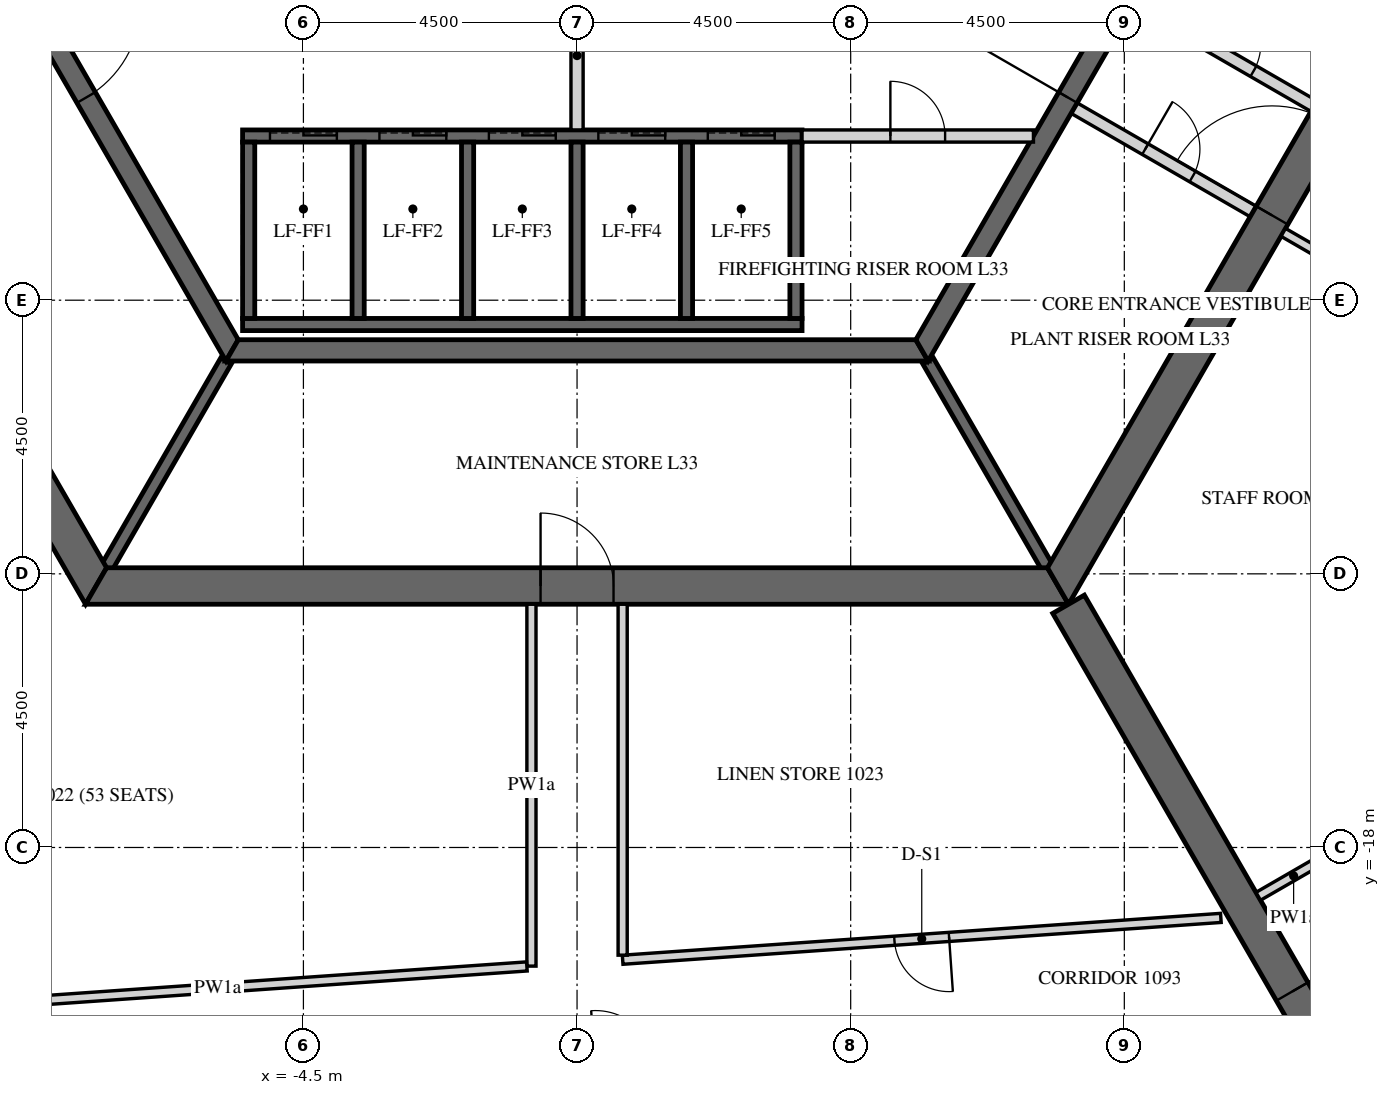
"""IFC4 building model, lengths in metres.
Left out: names, types, materials, properties, quantities, classifications, styles, units other than length and angle.
Written with IfcOpenShell. Run it as: python <this file> out.ifc"""

import sys

from ifc_helpers import new_model, si_unit, direction, frame, frame_2d, origin, place, context, subcontext, project, spatial, polyline, rectangle, outline, extrude, element, fill, save


model = new_model("IFC4")
c1 = context("Model", 3, precision=1e-05, world=origin(), true_north=direction((0.0, 1.0)))
c2 = subcontext(c1, "Body", "Model", "MODEL_VIEW")
j1 = project(units=[si_unit("LENGTHUNIT", "METRE"), si_unit("PLANEANGLEUNIT", "RADIAN")], contexts=[c1])
p1 = place(None, origin())
s1 = spatial("IfcSite", under=j1, at=p1, CompositionType="ELEMENT")
p2 = place(p1, origin())
s2 = spatial("IfcBuilding", under=s1, at=p2, CompositionType="ELEMENT")
p3 = place(p2, frame((0.0, 0.0, 142.8)))
s3 = spatial("IfcBuildingStorey", under=s2, at=p3, CompositionType="ELEMENT", Elevation=142.8)
p4 = place(p3, frame((-15.819, 0.0, -0.15), z_axis=(0.0, 0.0, 1.0), x_axis=(0.499999880136, -0.866025472988, 0.0)))
e1 = element("IfcWall", 1, at=p4, inside=s3, PredefinedType="SHEAR", context=c2, shape_type="SweptSolid", body=[
    extrude(outline(polyline([(-0.173, -0.3), (15.993, -0.3), (15.646, 0.3), (0.173, 0.3), (-0.173, -0.3)])), origin(), (0.0, 0.0, 1.0), 3.75),
])
p5 = place(p4, frame((6.981, 0.0, 0.15)))
e2 = element("IfcOpeningElement", 2, at=p5, cuts=e1, PredefinedType="OPENING", context=c2, shape_type="SweptSolid", body=[
    extrude(rectangle(XDim=1.8, YDim=2.4, at=frame_2d((0.9, 1.2))), frame((0.0, 0.31, 0.0), z_axis=(0.0, -1.0, 0.0), x_axis=(1.0, 0.0, 0.0)), (0.0, 0.0, 1.0), 0.62),
])
p6 = place(p3, frame((-7.91, -13.7, -0.15), z_axis=(0.0, 0.0, 1.0), x_axis=(1.0, 0.0, 0.0)))
e3 = element("IfcWall", 3, at=p6, inside=s3, PredefinedType="SHEAR", context=c2, shape_type="SweptSolid", body=[
    extrude(outline(polyline([(-0.173, -0.3), (15.993, -0.3), (15.646, 0.3), (0.173, 0.3), (-0.173, -0.3)])), origin(), (0.0, 0.0, 1.0), 3.75),
])
p7 = place(p6, frame((7.31, 0.0, 0.15)))
e4 = element("IfcOpeningElement", 4, at=p7, cuts=e3, PredefinedType="OPENING", context=c2, shape_type="SweptSolid", body=[
    extrude(rectangle(XDim=1.2, YDim=2.4, at=frame_2d((0.6, 1.2))), frame((0.0, 0.31, 0.0), z_axis=(0.0, -1.0, 0.0), x_axis=(1.0, 0.0, 0.0)), (0.0, 0.0, 1.0), 0.62),
])
p8 = place(p3, frame((7.91, -13.7, -0.15), z_axis=(0.0, 0.0, 1.0), x_axis=(0.499999880136, 0.866025472988, 0.0)))
e5 = element("IfcWall", 5, at=p8, inside=s3, PredefinedType="SHEAR", context=c2, shape_type="SweptSolid", body=[
    extrude(outline(polyline([(-0.173, -0.3), (15.993, -0.3), (15.646, 0.3), (0.173, 0.3), (-0.173, -0.3)])), origin(), (0.0, 0.0, 1.0), 3.75),
])
p9 = place(p8, frame((7.039, 0.0, 0.15)))
e6 = element("IfcOpeningElement", 6, at=p9, cuts=e5, PredefinedType="OPENING", context=c2, shape_type="SweptSolid", body=[
    extrude(rectangle(XDim=1.8, YDim=2.4, at=frame_2d((0.9, 1.2))), frame((0.0, 0.31, 0.0), z_axis=(0.0, -1.0, 0.0), x_axis=(1.0, 0.0, 0.0)), (0.0, 0.0, 1.0), 0.62),
])
p10 = place(p3, frame((8.083, -14.0, -0.15), z_axis=(0.0, 0.0, 1.0), x_axis=(0.499997680643, -0.866026742862, 0.0)))
e7 = element("IfcWall", 7, at=p10, inside=s3, PredefinedType="SHEAR", context=c2, shape_type="SweptSolid", body=[
    extrude(rectangle(XDim=16.509, YDim=0.6, at=frame_2d((8.254, 0.0))), origin(), (0.0, 0.0, 1.0), 3.75),
])
p11 = place(p10, frame((7.354, 0.0, 0.15)))
e8 = element("IfcOpeningElement", 8, at=p11, cuts=e7, PredefinedType="OPENING", context=c2, shape_type="SweptSolid", body=[
    extrude(rectangle(XDim=1.8, YDim=2.4, at=frame_2d((0.9, 1.2))), frame((0.0, 0.31, 0.0), z_axis=(0.0, -1.0, 0.0), x_axis=(1.0, 0.0, 0.0)), (0.0, 0.0, 1.0), 0.62),
])
p12 = place(p3, frame((-11.345, 0.0, -0.15), z_axis=(0.0, 0.0, 1.0), x_axis=(0.499995046907, -0.866028263435, 0.0)))
e9 = element("IfcWall", 9, at=p12, inside=s3, PredefinedType="SHEAR", context=c2, shape_type="SweptSolid", body=[
    extrude(outline(polyline([(-0.101, -0.175), (11.446, -0.175), (11.244, 0.175), (0.101, 0.175), (-0.101, -0.175)])), origin(), (0.0, 0.0, 1.0), 3.75),
])
p13 = place(p12, frame((4.744, 0.0, 0.15)))
e10 = element("IfcOpeningElement", 10, at=p13, cuts=e9, PredefinedType="OPENING", context=c2, shape_type="SweptSolid", body=[
    extrude(rectangle(XDim=1.8, YDim=2.4, at=frame_2d((0.9, 1.2))), frame((0.0, 0.185, 0.0), z_axis=(0.0, -1.0, 0.0), x_axis=(1.0, 0.0, 0.0)), (0.0, 0.0, 1.0), 0.37),
])
p14 = place(p3, frame((-5.673, -9.825, -0.15), z_axis=(0.0, 0.0, 1.0), x_axis=(1.0, 0.0, 0.0)))
e11 = element("IfcWall", 11, at=p14, inside=s3, PredefinedType="SHEAR", context=c2, shape_type="SweptSolid", body=[
    extrude(outline(polyline([(-0.101, -0.175), (11.446, -0.175), (11.244, 0.175), (0.101, 0.175), (-0.101, -0.175)])), origin(), (0.0, 0.0, 1.0), 3.75),
])
p15 = place(p3, frame((5.673, -9.825, -0.15), z_axis=(0.0, 0.0, 1.0), x_axis=(0.499995046907, 0.866028263435, 0.0)))
e12 = element("IfcWall", 12, at=p15, inside=s3, PredefinedType="SHEAR", context=c2, shape_type="SweptSolid", body=[
    extrude(outline(polyline([(-0.101, -0.175), (11.446, -0.175), (11.244, 0.175), (0.101, 0.175), (-0.101, -0.175)])), origin(), (0.0, 0.0, 1.0), 3.75),
])
p16 = place(p15, frame((4.801, 0.0, 0.15)))
e13 = element("IfcOpeningElement", 13, at=p16, cuts=e12, PredefinedType="OPENING", context=c2, shape_type="SweptSolid", body=[
    extrude(rectangle(XDim=1.8, YDim=2.4, at=frame_2d((0.9, 1.2))), frame((0.0, 0.185, 0.0), z_axis=(0.0, -1.0, 0.0), x_axis=(1.0, 0.0, 0.0)), (0.0, 0.0, 1.0), 0.37),
])
p17 = place(p3, frame((-5.5, -6.3, -0.25), z_axis=(0.0, 0.0, 1.0), x_axis=(1.0, 0.0, 0.0)))
e14 = element("IfcWall", 14, at=p17, inside=s3, PredefinedType="SHEAR", context=c2, shape_type="SweptSolid", body=[
    extrude(rectangle(XDim=9.2, YDim=0.2, at=frame_2d((4.6, 0.0))), origin(), (0.0, 0.0, 1.0), 3.9),
])
p18 = place(p17, frame((0.45, 0.0, 0.25)))
e15 = element("IfcOpeningElement", 15, at=p18, cuts=e14, PredefinedType="OPENING", context=c2, shape_type="SweptSolid", body=[
    extrude(rectangle(XDim=1.1, YDim=2.1, at=frame_2d((0.55, 1.05))), frame((0.0, 0.11, 0.0), z_axis=(0.0, -1.0, 0.0), x_axis=(1.0, 0.0, 0.0)), (0.0, 0.0, 1.0), 0.22),
])
p19 = place(p17, frame((2.25, 0.0, 0.25)))
e16 = element("IfcOpeningElement", 16, at=p19, cuts=e14, PredefinedType="OPENING", context=c2, shape_type="SweptSolid", body=[
    extrude(rectangle(XDim=1.1, YDim=2.1, at=frame_2d((0.55, 1.05))), frame((0.0, 0.11, 0.0), z_axis=(0.0, -1.0, 0.0), x_axis=(1.0, 0.0, 0.0)), (0.0, 0.0, 1.0), 0.22),
])
p20 = place(p17, frame((4.05, 0.0, 0.25)))
e17 = element("IfcOpeningElement", 17, at=p20, cuts=e14, PredefinedType="OPENING", context=c2, shape_type="SweptSolid", body=[
    extrude(rectangle(XDim=1.1, YDim=2.1, at=frame_2d((0.55, 1.05))), frame((0.0, 0.11, 0.0), z_axis=(0.0, -1.0, 0.0), x_axis=(1.0, 0.0, 0.0)), (0.0, 0.0, 1.0), 0.22),
])
p21 = place(p17, frame((5.85, 0.0, 0.25)))
e18 = element("IfcOpeningElement", 18, at=p21, cuts=e14, PredefinedType="OPENING", context=c2, shape_type="SweptSolid", body=[
    extrude(rectangle(XDim=1.1, YDim=2.1, at=frame_2d((0.55, 1.05))), frame((0.0, 0.11, 0.0), z_axis=(0.0, -1.0, 0.0), x_axis=(1.0, 0.0, 0.0)), (0.0, 0.0, 1.0), 0.22),
])
p22 = place(p17, frame((7.65, 0.0, 0.25)))
e19 = element("IfcOpeningElement", 19, at=p22, cuts=e14, PredefinedType="OPENING", context=c2, shape_type="SweptSolid", body=[
    extrude(rectangle(XDim=1.1, YDim=2.1, at=frame_2d((0.55, 1.05))), frame((0.0, 0.11, 0.0), z_axis=(0.0, -1.0, 0.0), x_axis=(1.0, 0.0, 0.0)), (0.0, 0.0, 1.0), 0.22),
])
p23 = place(p3, frame((-5.5, -9.4, -0.25), z_axis=(0.0, 0.0, 1.0), x_axis=(1.0, 0.0, 0.0)))
e20 = element("IfcWall", 20, at=p23, inside=s3, PredefinedType="SHEAR", context=c2, shape_type="SweptSolid", body=[
    extrude(rectangle(XDim=9.2, YDim=0.2, at=frame_2d((4.6, 0.0))), origin(), (0.0, 0.0, 1.0), 3.9),
])
for number, where, z_axis, x_axis in (
    (21, (-5.4, -9.3, -0.25), (0.0, 0.0, 1.0), (0.0, 1.0, 0.0)),
    (22, (-3.6, -9.3, -0.25), (0.0, 0.0, 1.0), (0.0, 1.0, 0.0)),
    (23, (-1.8, -9.3, -0.25), (0.0, 0.0, 1.0), (0.0, 1.0, 0.0)),
    (24, (0.0, -9.3, -0.25), (0.0, 0.0, 1.0), (0.0, 1.0, 0.0)),
    (25, (1.8, -9.3, -0.25), (0.0, 0.0, 1.0), (0.0, 1.0, 0.0)),
    (26, (3.6, -9.3, -0.25), (0.0, 0.0, 1.0), (0.0, 1.0, 0.0)),
):
    element("IfcWall", number, at=place(p3, frame(where, z_axis=z_axis, x_axis=x_axis)), inside=s3, PredefinedType="SHEAR", context=c2, shape_type="SweptSolid", body=[
        extrude(rectangle(XDim=2.9, YDim=0.2, at=frame_2d((1.45, 0.0))), origin(), (0.0, 0.0, 1.0), 3.9),
    ])
p24 = place(p3, frame((0.0, -6.2, 0.0), z_axis=(0.0, 0.0, 1.0), x_axis=(0.0, 1.0, 0.0)))
e27 = element("IfcWall", 27, at=p24, inside=s3, PredefinedType="PARTITIONING", context=c2, shape_type="SweptSolid", body=[
    extrude(rectangle(XDim=6.1, YDim=0.2, at=frame_2d((3.05, 0.0))), origin(), (0.0, 0.0, 1.0), 3.65),
])
p25 = place(p3, frame((3.7, -6.3, 0.0), z_axis=(0.0, 0.0, 1.0), x_axis=(1.0, 0.0, 0.0)))
e28 = element("IfcWall", 28, at=p25, inside=s3, PredefinedType="PARTITIONING", context=c2, shape_type="SweptSolid", body=[
    extrude(rectangle(XDim=3.806, YDim=0.2, at=frame_2d((1.903, 0.0))), origin(), (0.0, 0.0, 1.0), 3.65),
])
p26 = place(p25, frame((1.453, 0.0, 0.0)))
e29 = element("IfcOpeningElement", 29, at=p26, cuts=e28, PredefinedType="OPENING", context=c2, shape_type="SweptSolid", body=[
    extrude(rectangle(XDim=0.9, YDim=2.1, at=frame_2d((0.45, 1.05))), frame((0.0, 0.11, 0.0), z_axis=(0.0, -1.0, 0.0), x_axis=(1.0, 0.0, 0.0)), (0.0, 0.0, 1.0), 0.22),
])
for number, where, z_axis, x_axis in (
    (30, (-5.773, -10.0, -0.15), (0.0, 0.0, 1.0), (-0.5, -0.866, 0.0)),
    (31, (5.773, -10.0, -0.15), (0.0, 0.0, 1.0), (0.5, -0.866, 0.0)),
):
    element("IfcWall", number, at=place(p3, frame(where, z_axis=z_axis, x_axis=x_axis)), inside=s3, PredefinedType="SHEAR", context=c2, shape_type="SweptSolid", body=[
        extrude(rectangle(XDim=3.926, YDim=0.2, at=frame_2d((1.963, 0.0))), origin(), (0.0, 0.0, 1.0), 3.75),
    ])
p27 = place(p3, frame((9.175, -4.109, 0.0), z_axis=(0.0, 0.0, 1.0), x_axis=(0.865989465428, -0.500062241894, 0.0)))
e32 = element("IfcWall", 32, at=p27, inside=s3, PredefinedType="PARTITIONING", context=c2, shape_type="SweptSolid", body=[
    extrude(rectangle(XDim=3.4, YDim=0.2, at=frame_2d((1.7, 0.0))), origin(), (0.0, 0.0, 1.0), 3.65),
])
p28 = place(p27, frame((1.351, 0.0, 0.0)))
e33 = element("IfcOpeningElement", 33, at=p28, cuts=e32, PredefinedType="OPENING", context=c2, shape_type="SweptSolid", body=[
    extrude(rectangle(XDim=0.9, YDim=2.1, at=frame_2d((0.45, 1.05))), frame((0.0, 0.11, 0.0), z_axis=(0.0, -1.0, 0.0), x_axis=(1.0, 0.0, 0.0)), (0.0, 0.0, 1.0), 0.22),
])
p29 = place(p3, frame((8.175, -5.841, 0.0), z_axis=(0.0, 0.0, 1.0), x_axis=(0.866020560687, -0.500008388397, 0.0)))
e34 = element("IfcWall", 34, at=p29, inside=s3, PredefinedType="PARTITIONING", context=c2, shape_type="SweptSolid", body=[
    extrude(rectangle(XDim=3.4, YDim=0.2, at=frame_2d((1.7, 0.0))), origin(), (0.0, 0.0, 1.0), 3.65),
])
p30 = place(p29, frame((1.35, 0.0, 0.0)))
e35 = element("IfcOpeningElement", 35, at=p30, cuts=e34, PredefinedType="OPENING", context=c2, shape_type="SweptSolid", body=[
    extrude(rectangle(XDim=0.9, YDim=2.1, at=frame_2d((0.45, 1.05))), frame((0.0, 0.11, 0.0), z_axis=(0.0, -1.0, 0.0), x_axis=(1.0, 0.0, 0.0)), (0.0, 0.0, 1.0), 0.22),
])
p31 = place(p3, frame((-0.75, -14.0, 0.0), z_axis=(0.0, 0.0, 1.0), x_axis=(0.0, -1.0, 0.0)))
e36 = element("IfcWall", 36, at=p31, inside=s3, PredefinedType="PARTITIONING", context=c2, shape_type="SweptSolid", body=[
    extrude(rectangle(XDim=5.951, YDim=0.15, at=frame_2d((2.976, 0.0))), origin(), (0.0, 0.0, 1.0), 2.838),
])
p32 = place(p3, frame((-0.825, -19.956, 0.0), z_axis=(0.0, 0.0, 1.0), x_axis=(-0.997562587881, -0.069777383582, 0.0)))
e37 = element("IfcWall", 37, at=p32, inside=s3, PredefinedType="PARTITIONING", context=c2, shape_type="SweptSolid", body=[
    extrude(rectangle(XDim=10.189, YDim=0.15, at=frame_2d((5.094, 0.0))), origin(), (0.0, 0.0, 1.0), 2.838),
])
p33 = place(p3, frame((10.587, -19.158, 0.0), z_axis=(0.0, 0.0, 1.0), x_axis=(-0.997565137136, -0.069740928955, 0.0)))
e38 = element("IfcWall", 38, at=p33, inside=s3, PredefinedType="PARTITIONING", context=c2, shape_type="SweptSolid", body=[
    extrude(rectangle(XDim=9.861, YDim=0.15, at=frame_2d((4.931, 0.0))), origin(), (0.0, 0.0, 1.0), 2.838),
])
p34 = place(p33, frame((4.481, 0.0, 0.0)))
e39 = element("IfcOpeningElement", 39, at=p34, cuts=e38, PredefinedType="OPENING", context=c2, shape_type="SweptSolid", body=[
    extrude(rectangle(XDim=0.9, YDim=2.1, at=frame_2d((0.45, 1.05))), frame((0.0, 0.085, 0.0), z_axis=(0.0, -1.0, 0.0), x_axis=(1.0, 0.0, 0.0)), (0.0, 0.0, 1.0), 0.17),
])
p35 = place(p3, frame((0.75, -19.771, 0.0), z_axis=(0.0, 0.0, 1.0), x_axis=(0.0, 1.0, 0.0)))
e40 = element("IfcWall", 40, at=p35, inside=s3, PredefinedType="PARTITIONING", context=c2, shape_type="SweptSolid", body=[
    extrude(rectangle(XDim=5.771, YDim=0.15, at=frame_2d((2.885, 0.0))), origin(), (0.0, 0.0, 1.0), 2.838),
])
p36 = place(p3, frame((11.614, -7.884, 0.0), z_axis=(0.0, 0.0, 1.0), x_axis=(0.866018092707, -0.500012662943, 0.0)))
e41 = element("IfcWall", 41, at=p36, inside=s3, PredefinedType="PARTITIONING", context=c2, shape_type="SweptSolid", body=[
    extrude(rectangle(XDim=5.85, YDim=0.15, at=frame_2d((2.925, 0.0))), origin(), (0.0, 0.0, 1.0), 2.838),
])
p37 = place(p3, frame((12.366, -18.131, 0.0), z_axis=(0.0, 0.0, 1.0), x_axis=(-0.866043397086, -0.499968833392, 0.0)))
e42 = element("IfcWall", 42, at=p37, inside=s3, PredefinedType="PARTITIONING", context=c2, shape_type="SweptSolid", body=[
    extrude(rectangle(XDim=1.344, YDim=0.15, at=frame_2d((0.672, 0.0))), origin(), (0.0, 0.0, 1.0), 2.838),
])
p38 = place(p9, origin())
e43 = element("IfcDoor", 43, at=p38, inside=s3, OperationType="DOUBLE_DOOR_SINGLE_SWING", PredefinedType="DOOR", context=c2, shape_type="SweptSolid", body=[
    extrude(rectangle(XDim=1.8, YDim=2.4, at=frame_2d((0.9, 1.2))), frame((0.0, 0.025, 0.0), z_axis=(0.0, -1.0, 0.0), x_axis=(1.0, 0.0, 0.0)), (0.0, 0.0, 1.0), 0.05),
])
fill(e6, e43)
p39 = place(p7, origin())
e44 = element("IfcDoor", 44, at=p39, inside=s3, OperationType="SINGLE_SWING_LEFT", PredefinedType="DOOR", context=c2, shape_type="SweptSolid", body=[
    extrude(rectangle(XDim=1.2, YDim=2.4, at=frame_2d((0.6, 1.2))), frame((0.0, 0.025, 0.0), z_axis=(0.0, -1.0, 0.0), x_axis=(1.0, 0.0, 0.0)), (0.0, 0.0, 1.0), 0.05),
])
fill(e4, e44)
p40 = place(p11, origin())
e45 = element("IfcDoor", 45, at=p40, inside=s3, OperationType="DOUBLE_DOOR_SINGLE_SWING", PredefinedType="DOOR", context=c2, shape_type="SweptSolid", body=[
    extrude(rectangle(XDim=1.8, YDim=2.4, at=frame_2d((0.9, 1.2))), frame((0.0, 0.025, 0.0), z_axis=(0.0, -1.0, 0.0), x_axis=(1.0, 0.0, 0.0)), (0.0, 0.0, 1.0), 0.05),
])
fill(e8, e45)
p41 = place(p13, origin())
e46 = element("IfcDoor", 46, at=p41, inside=s3, OperationType="DOUBLE_DOOR_SINGLE_SWING", PredefinedType="DOOR", context=c2, shape_type="SweptSolid", body=[
    extrude(rectangle(XDim=1.8, YDim=2.4, at=frame_2d((0.9, 1.2))), frame((0.0, 0.025, 0.0), z_axis=(0.0, -1.0, 0.0), x_axis=(1.0, 0.0, 0.0)), (0.0, 0.0, 1.0), 0.05),
])
fill(e10, e46)
p42 = place(p16, origin())
e47 = element("IfcDoor", 47, at=p42, inside=s3, OperationType="DOUBLE_DOOR_SINGLE_SWING", PredefinedType="DOOR", context=c2, shape_type="SweptSolid", body=[
    extrude(rectangle(XDim=1.8, YDim=2.4, at=frame_2d((0.9, 1.2))), frame((0.0, 0.025, 0.0), z_axis=(0.0, -1.0, 0.0), x_axis=(1.0, 0.0, 0.0)), (0.0, 0.0, 1.0), 0.05),
])
fill(e13, e47)
p43 = place(p26, origin())
e48 = element("IfcDoor", 48, at=p43, inside=s3, OperationType="SINGLE_SWING_LEFT", PredefinedType="DOOR", context=c2, shape_type="SweptSolid", body=[
    extrude(rectangle(XDim=0.9, YDim=2.1, at=frame_2d((0.45, 1.05))), frame((0.0, 0.025, 0.0), z_axis=(0.0, -1.0, 0.0), x_axis=(1.0, 0.0, 0.0)), (0.0, 0.0, 1.0), 0.05),
])
fill(e29, e48)
p44 = place(p28, origin())
e49 = element("IfcDoor", 49, at=p44, inside=s3, OperationType="SINGLE_SWING_LEFT", PredefinedType="DOOR", context=c2, shape_type="SweptSolid", body=[
    extrude(rectangle(XDim=0.9, YDim=2.1, at=frame_2d((0.45, 1.05))), frame((0.0, 0.025, 0.0), z_axis=(0.0, -1.0, 0.0), x_axis=(1.0, 0.0, 0.0)), (0.0, 0.0, 1.0), 0.05),
])
fill(e33, e49)
p45 = place(p30, origin())
e50 = element("IfcDoor", 50, at=p45, inside=s3, OperationType="SINGLE_SWING_LEFT", PredefinedType="DOOR", context=c2, shape_type="SweptSolid", body=[
    extrude(rectangle(XDim=0.9, YDim=2.1, at=frame_2d((0.45, 1.05))), frame((0.0, 0.025, 0.0), z_axis=(0.0, -1.0, 0.0), x_axis=(1.0, 0.0, 0.0)), (0.0, 0.0, 1.0), 0.05),
])
fill(e35, e50)
p46 = place(p18, origin())
e51 = element("IfcDoor", 51, at=p46, inside=s3, OperationType="SLIDING_TO_LEFT", PredefinedType="DOOR", context=c2, shape_type="SweptSolid", body=[
    extrude(rectangle(XDim=1.1, YDim=2.1, at=frame_2d((0.55, 1.05))), frame((0.0, 0.025, 0.0), z_axis=(0.0, -1.0, 0.0), x_axis=(1.0, 0.0, 0.0)), (0.0, 0.0, 1.0), 0.05),
])
fill(e15, e51)
p47 = place(p19, origin())
e52 = element("IfcDoor", 52, at=p47, inside=s3, OperationType="SLIDING_TO_LEFT", PredefinedType="DOOR", context=c2, shape_type="SweptSolid", body=[
    extrude(rectangle(XDim=1.1, YDim=2.1, at=frame_2d((0.55, 1.05))), frame((0.0, 0.025, 0.0), z_axis=(0.0, -1.0, 0.0), x_axis=(1.0, 0.0, 0.0)), (0.0, 0.0, 1.0), 0.05),
])
fill(e16, e52)
p48 = place(p20, origin())
e53 = element("IfcDoor", 53, at=p48, inside=s3, OperationType="SLIDING_TO_LEFT", PredefinedType="DOOR", context=c2, shape_type="SweptSolid", body=[
    extrude(rectangle(XDim=1.1, YDim=2.1, at=frame_2d((0.55, 1.05))), frame((0.0, 0.025, 0.0), z_axis=(0.0, -1.0, 0.0), x_axis=(1.0, 0.0, 0.0)), (0.0, 0.0, 1.0), 0.05),
])
fill(e17, e53)
p49 = place(p21, origin())
e54 = element("IfcDoor", 54, at=p49, inside=s3, OperationType="SLIDING_TO_LEFT", PredefinedType="DOOR", context=c2, shape_type="SweptSolid", body=[
    extrude(rectangle(XDim=1.1, YDim=2.1, at=frame_2d((0.55, 1.05))), frame((0.0, 0.025, 0.0), z_axis=(0.0, -1.0, 0.0), x_axis=(1.0, 0.0, 0.0)), (0.0, 0.0, 1.0), 0.05),
])
fill(e18, e54)
p50 = place(p22, origin())
e55 = element("IfcDoor", 55, at=p50, inside=s3, OperationType="SLIDING_TO_LEFT", PredefinedType="DOOR", context=c2, shape_type="SweptSolid", body=[
    extrude(rectangle(XDim=1.1, YDim=2.1, at=frame_2d((0.55, 1.05))), frame((0.0, 0.025, 0.0), z_axis=(0.0, -1.0, 0.0), x_axis=(1.0, 0.0, 0.0)), (0.0, 0.0, 1.0), 0.05),
])
fill(e19, e55)
p51 = place(p34, origin())
e56 = element("IfcDoor", 56, at=p51, inside=s3, OperationType="SINGLE_SWING_RIGHT", PredefinedType="DOOR", context=c2, shape_type="SweptSolid", body=[
    extrude(rectangle(XDim=0.9, YDim=2.1, at=frame_2d((0.45, 1.05))), frame((0.0, 0.025, 0.0), z_axis=(0.0, -1.0, 0.0), x_axis=(1.0, 0.0, 0.0)), (0.0, 0.0, 1.0), 0.05),
])
fill(e39, e56)
save(model, sys.argv[1])
